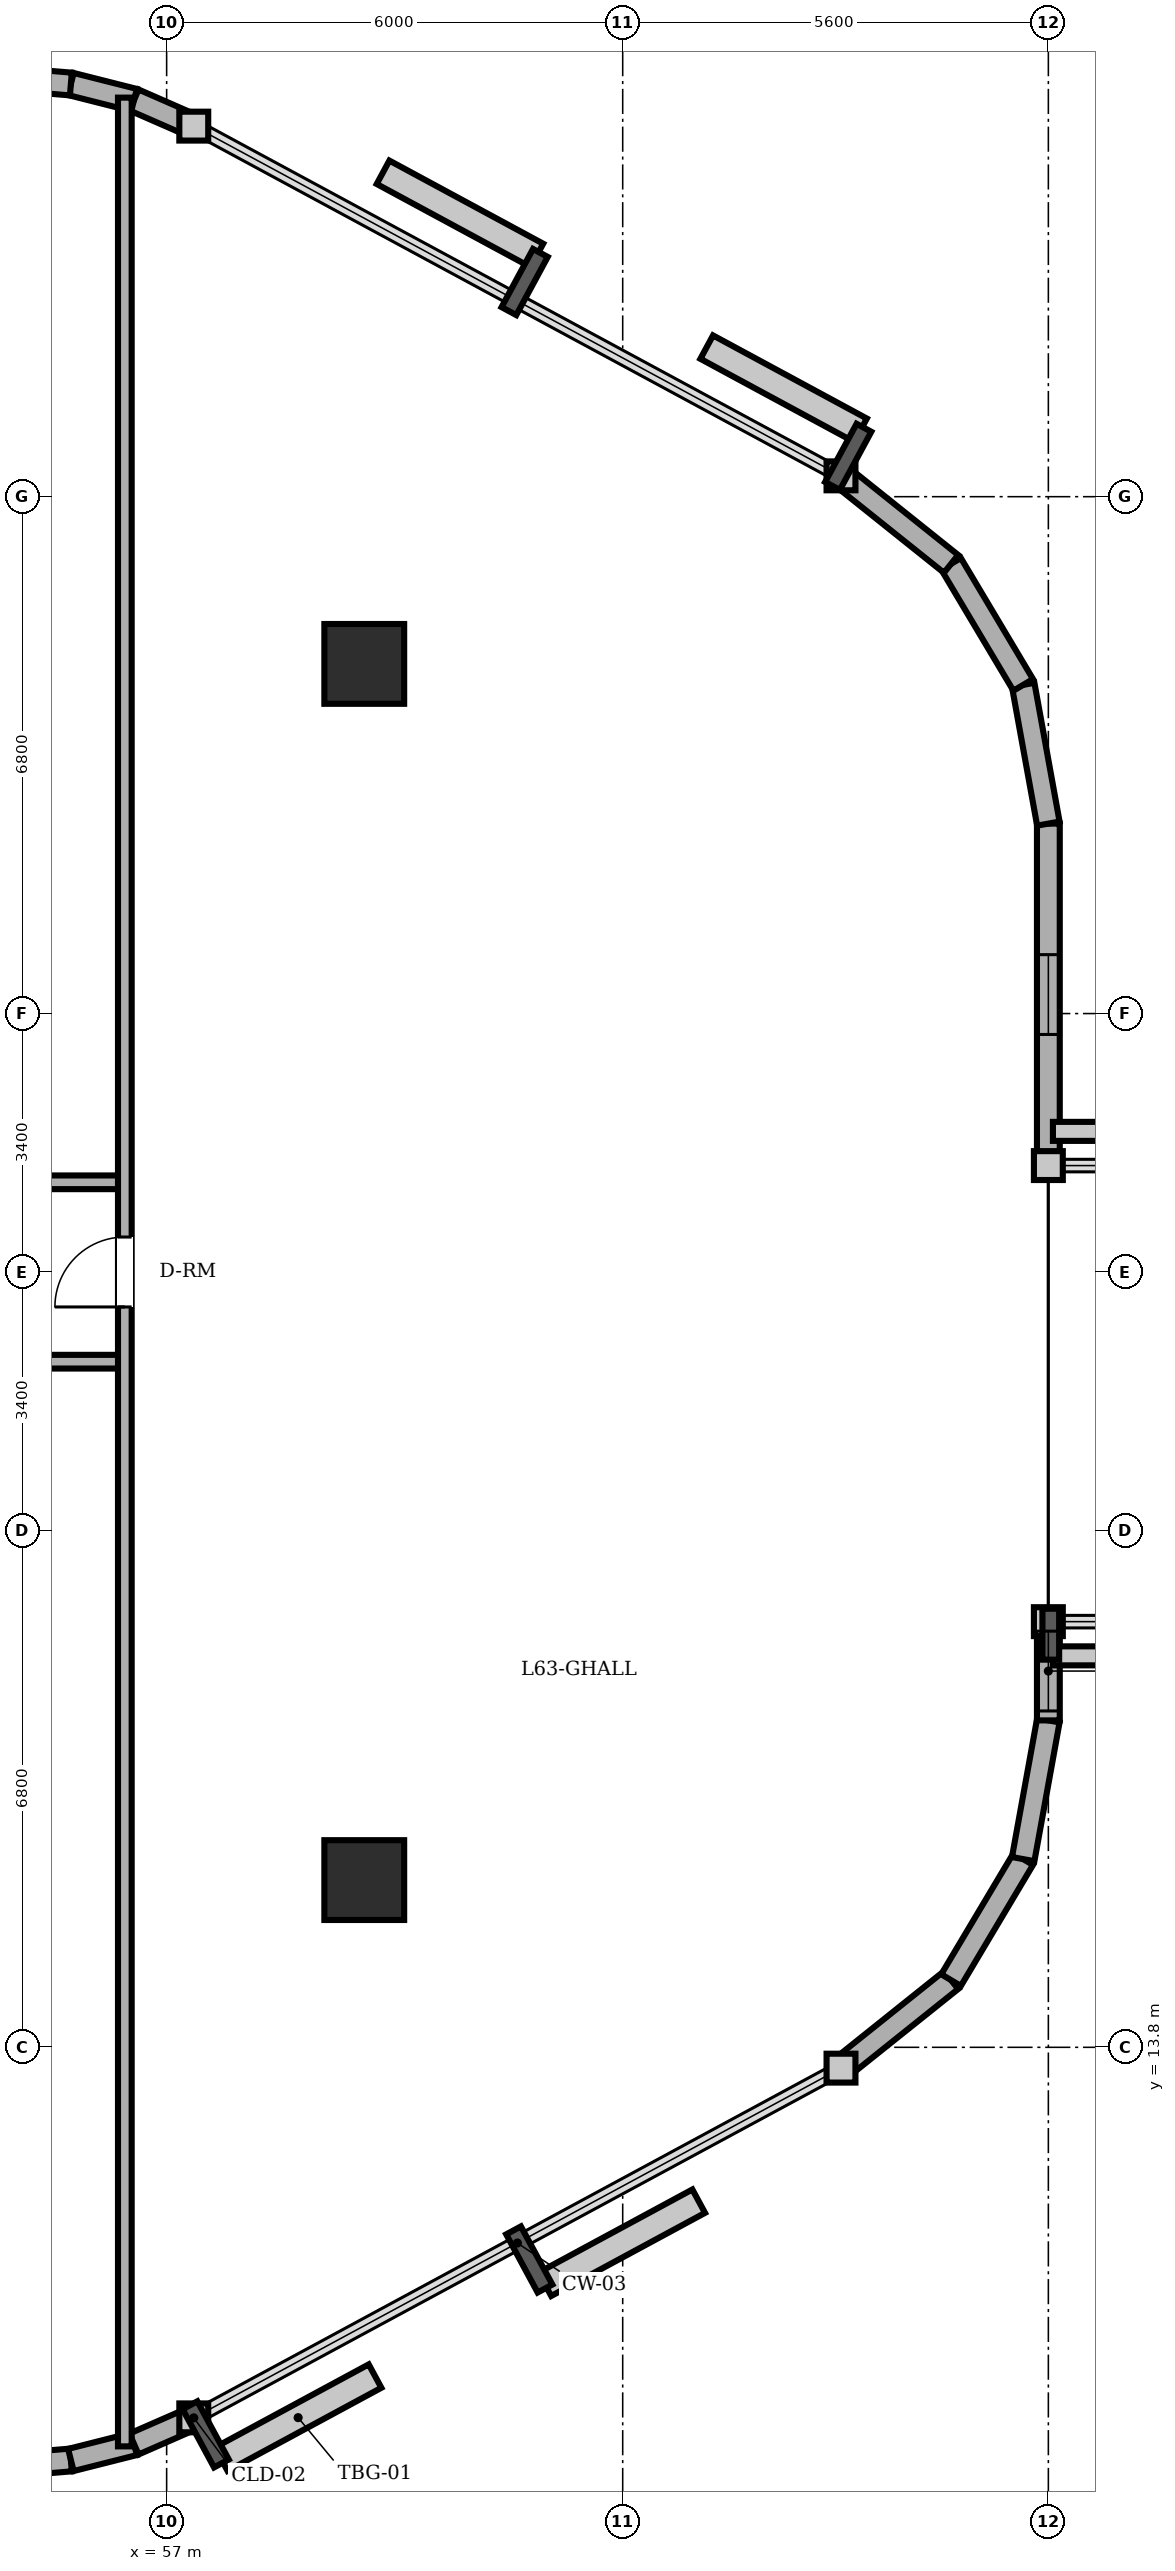
"""IFC4 building model, lengths in metres.
Left out: names, types, materials, properties, quantities, classifications, styles, units other than length and angle.
Written with IfcOpenShell. Run it as: python <this file> out.ifc"""

import sys

from ifc_helpers import new_model, si_unit, direction, frame, frame_2d, origin, origin_2d, place, context, subcontext, project, spatial, rectangle, circle, extrude, element, fill, save


model = new_model("IFC4")
c1 = context("Model", 3, precision=1e-05, world=origin(), true_north=direction((0.0, 1.0)))
c2 = subcontext(c1, "Body", "Model", "MODEL_VIEW")
j1 = project(units=[si_unit("LENGTHUNIT", "METRE"), si_unit("PLANEANGLEUNIT", "RADIAN")], contexts=[c1])
p1 = place(None, origin())
s1 = spatial("IfcSite", under=j1, at=p1, CompositionType="ELEMENT")
p2 = place(p1, origin())
s2 = spatial("IfcBuilding", under=s1, at=p2, CompositionType="ELEMENT")
p3 = place(p2, frame((0.0, 0.0, 240.9)))
s3 = spatial("IfcBuildingStorey", under=s2, at=p3, CompositionType="ELEMENT", Elevation=240.9)
for number, where, z_axis, x_axis in (
    (1, (59.6, 16.0, 0.0), (0.0, 0.0, 1.0), (1.0, 0.0, 0.0)),
    (2, (59.6, 32.0, 0.0), (0.0, 0.0, 1.0), (1.0, 0.0, 0.0)),
):
    element("IfcColumn", number, at=place(p3, frame(where, z_axis=z_axis, x_axis=x_axis)), inside=s3, PredefinedType="COLUMN", context=c2, shape_type="SweptSolid", body=[
        extrude(circle(Radius=0.525, at=origin_2d()), origin(), (0.0, 0.0, 1.0), 3.6),
    ])
p4 = place(p3, frame((54.885, 8.3, 0.0), z_axis=(0.0, 0.0, 1.0), x_axis=(0.996565355958, 0.082809971041, 0.0)))
e3 = element("IfcWall", 3, at=p4, inside=s3, PredefinedType="SOLIDWALL", context=c2, shape_type="SweptSolid", body=[
    extrude(rectangle(XDim=0.858, YDim=0.3, at=frame_2d((0.429, 0.0))), origin(), (0.0, 0.0, 1.0), 3.4),
])
p5 = place(p3, frame((55.74, 8.371, 0.0), z_axis=(0.0, 0.0, 1.0), x_axis=(0.969536346338, 0.244947490555, 0.0)))
e4 = element("IfcWall", 4, at=p5, inside=s3, PredefinedType="SOLIDWALL", context=c2, shape_type="SweptSolid", body=[
    extrude(rectangle(XDim=0.857, YDim=0.3, at=frame_2d((0.429, 0.0))), origin(), (0.0, 0.0, 1.0), 3.4),
])
p6 = place(p3, frame((56.571, 8.581, 0.0), z_axis=(0.0, 0.0, 1.0), x_axis=(0.916085473636, 0.400983048261, 0.0)))
e5 = element("IfcWall", 5, at=p6, inside=s3, PredefinedType="SOLIDWALL", context=c2, shape_type="SweptSolid", body=[
    extrude(rectangle(XDim=0.858, YDim=0.3, at=frame_2d((0.429, 0.0))), origin(), (0.0, 0.0, 1.0), 3.4),
])
p7 = place(p3, frame((65.872, 13.526, 0.0), z_axis=(0.0, 0.0, 1.0), x_axis=(0.780920189257, 0.624630817372, 0.0)))
e6 = element("IfcWall", 6, at=p7, inside=s3, PredefinedType="SOLIDWALL", context=c2, shape_type="SweptSolid", body=[
    extrude(rectangle(XDim=1.854, YDim=0.3, at=frame_2d((0.927, 0.0))), origin(), (0.0, 0.0, 1.0), 3.4),
])
p8 = place(p3, frame((67.32, 14.684, 0.0), z_axis=(0.0, 0.0, 1.0), x_axis=(0.512072018927, 0.858942516955, 0.0)))
e7 = element("IfcWall", 7, at=p8, inside=s3, PredefinedType="SOLIDWALL", context=c2, shape_type="SweptSolid", body=[
    extrude(rectangle(XDim=1.853, YDim=0.3, at=frame_2d((0.927, 0.0))), origin(), (0.0, 0.0, 1.0), 3.4),
])
p9 = place(p3, frame((68.269, 16.276, 0.0), z_axis=(0.0, 0.0, 1.0), x_axis=(0.178468469252, 0.983945631365, 0.0)))
e8 = element("IfcWall", 8, at=p9, inside=s3, PredefinedType="SOLIDWALL", context=c2, shape_type="SweptSolid", body=[
    extrude(rectangle(XDim=1.855, YDim=0.3, at=frame_2d((0.927, 0.0))), origin(), (0.0, 0.0, 1.0), 3.4),
])
p10 = place(p3, frame((68.6, 18.101, 0.0), z_axis=(0.0, 0.0, 1.0), x_axis=(0.0, 1.0, 0.0)))
e9 = element("IfcWall", 9, at=p10, inside=s3, PredefinedType="SOLIDWALL", context=c2, shape_type="SweptSolid", body=[
    extrude(rectangle(XDim=1.299, YDim=0.3, at=frame_2d((0.649, 0.0))), origin(), (0.0, 0.0, 1.0), 3.4),
])
p11 = place(p10, frame((0.124, 0.0, 0.85)))
e10 = element("IfcOpeningElement", 10, at=p11, cuts=e9, PredefinedType="OPENING", context=c2, shape_type="SweptSolid", body=[
    extrude(rectangle(XDim=1.05, YDim=1.55, at=frame_2d((0.525, 0.775))), frame((0.0, 0.16, 0.0), z_axis=(0.0, -1.0, 0.0), x_axis=(1.0, 0.0, 0.0)), (0.0, 0.0, 1.0), 0.32),
])
p12 = place(p3, frame((68.6, 25.4, 0.0), z_axis=(0.0, 0.0, 1.0), x_axis=(0.0, 1.0, 0.0)))
e11 = element("IfcWall", 11, at=p12, inside=s3, PredefinedType="SOLIDWALL", context=c2, shape_type="SweptSolid", body=[
    extrude(rectangle(XDim=4.499, YDim=0.3, at=frame_2d((2.25, 0.0))), origin(), (0.0, 0.0, 1.0), 3.4),
])
p13 = place(p12, frame((1.725, 0.0, 0.85)))
e12 = element("IfcOpeningElement", 12, at=p13, cuts=e11, PredefinedType="OPENING", context=c2, shape_type="SweptSolid", body=[
    extrude(rectangle(XDim=1.05, YDim=1.55, at=frame_2d((0.525, 0.775))), frame((0.0, 0.16, 0.0), z_axis=(0.0, -1.0, 0.0), x_axis=(1.0, 0.0, 0.0)), (0.0, 0.0, 1.0), 0.32),
])
p14 = place(p3, frame((68.6, 29.899, 0.0), z_axis=(0.0, 0.0, 1.0), x_axis=(-0.178468469252, 0.983945631365, 0.0)))
e13 = element("IfcWall", 13, at=p14, inside=s3, PredefinedType="SOLIDWALL", context=c2, shape_type="SweptSolid", body=[
    extrude(rectangle(XDim=1.855, YDim=0.3, at=frame_2d((0.927, 0.0))), origin(), (0.0, 0.0, 1.0), 3.4),
])
p15 = place(p3, frame((68.269, 31.724, 0.0), z_axis=(0.0, 0.0, 1.0), x_axis=(-0.512072018927, 0.858942516955, 0.0)))
e14 = element("IfcWall", 14, at=p15, inside=s3, PredefinedType="SOLIDWALL", context=c2, shape_type="SweptSolid", body=[
    extrude(rectangle(XDim=1.853, YDim=0.3, at=frame_2d((0.927, 0.0))), origin(), (0.0, 0.0, 1.0), 3.4),
])
p16 = place(p3, frame((67.32, 33.316, 0.0), z_axis=(0.0, 0.0, 1.0), x_axis=(-0.780920189257, 0.624630817372, 0.0)))
e15 = element("IfcWall", 15, at=p16, inside=s3, PredefinedType="SOLIDWALL", context=c2, shape_type="SweptSolid", body=[
    extrude(rectangle(XDim=1.854, YDim=0.3, at=frame_2d((0.927, 0.0))), origin(), (0.0, 0.0, 1.0), 3.4),
])
p17 = place(p3, frame((57.357, 39.075, 0.0), z_axis=(0.0, 0.0, 1.0), x_axis=(-0.916085473636, 0.400983048261, 0.0)))
e16 = element("IfcWall", 16, at=p17, inside=s3, PredefinedType="SOLIDWALL", context=c2, shape_type="SweptSolid", body=[
    extrude(rectangle(XDim=0.858, YDim=0.3, at=frame_2d((0.429, 0.0))), origin(), (0.0, 0.0, 1.0), 3.4),
])
p18 = place(p3, frame((56.571, 39.419, 0.0), z_axis=(0.0, 0.0, 1.0), x_axis=(-0.969536346338, 0.244947490555, 0.0)))
e17 = element("IfcWall", 17, at=p18, inside=s3, PredefinedType="SOLIDWALL", context=c2, shape_type="SweptSolid", body=[
    extrude(rectangle(XDim=0.857, YDim=0.3, at=frame_2d((0.429, 0.0))), origin(), (0.0, 0.0, 1.0), 3.4),
])
p19 = place(p3, frame((55.74, 39.629, 0.0), z_axis=(0.0, 0.0, 1.0), x_axis=(-0.996565355958, 0.082809971041, 0.0)))
e18 = element("IfcWall", 18, at=p19, inside=s3, PredefinedType="SOLIDWALL", context=c2, shape_type="SweptSolid", body=[
    extrude(rectangle(XDim=0.858, YDim=0.3, at=frame_2d((0.429, 0.0))), origin(), (0.0, 0.0, 1.0), 3.4),
])
p20 = place(p3, frame((41.75, 22.82, 0.0), z_axis=(0.0, 0.0, 1.0), x_axis=(1.0, 0.0, 0.0)))
e19 = element("IfcWall", 19, at=p20, inside=s3, PredefinedType="PARTITIONING", context=c2, shape_type="SweptSolid", body=[
    extrude(rectangle(XDim=14.7, YDim=0.18, at=frame_2d((7.35, 0.0))), origin(), (0.0, 0.0, 1.0), 3.4),
])
p21 = place(p20, frame((6.89, 0.0, 0.0)))
e20 = element("IfcOpeningElement", 20, at=p21, cuts=e19, PredefinedType="OPENING", context=c2, shape_type="SweptSolid", body=[
    extrude(rectangle(XDim=0.92, YDim=2.1, at=frame_2d((0.46, 1.05))), frame((0.0, 0.1, 0.0), z_axis=(0.0, -1.0, 0.0), x_axis=(1.0, 0.0, 0.0)), (0.0, 0.0, 1.0), 0.2),
])
p22 = place(p3, frame((41.75, 25.18, 0.0), z_axis=(0.0, 0.0, 1.0), x_axis=(1.0, 0.0, 0.0)))
e21 = element("IfcWall", 21, at=p22, inside=s3, PredefinedType="PARTITIONING", context=c2, shape_type="SweptSolid", body=[
    extrude(rectangle(XDim=14.7, YDim=0.18, at=frame_2d((7.35, 0.0))), origin(), (0.0, 0.0, 1.0), 3.4),
])
p23 = place(p22, frame((6.89, 0.0, 0.0)))
e22 = element("IfcOpeningElement", 22, at=p23, cuts=e21, PredefinedType="OPENING", context=c2, shape_type="SweptSolid", body=[
    extrude(rectangle(XDim=0.92, YDim=2.1, at=frame_2d((0.46, 1.05))), frame((0.0, 0.1, 0.0), z_axis=(0.0, -1.0, 0.0), x_axis=(1.0, 0.0, 0.0)), (0.0, 0.0, 1.0), 0.2),
])
p24 = place(p3, frame((56.45, 8.55, 0.0), z_axis=(0.0, 0.0, 1.0), x_axis=(0.0, 1.0, 0.0)))
e23 = element("IfcWall", 23, at=p24, inside=s3, PredefinedType="PARTITIONING", context=c2, shape_type="SweptSolid", body=[
    extrude(rectangle(XDim=30.9, YDim=0.18, at=frame_2d((15.45, 0.0))), origin(), (0.0, 0.0, 1.0), 3.4),
])
p25 = place(p24, frame((14.99, 0.0, 0.0)))
e24 = element("IfcOpeningElement", 24, at=p25, cuts=e23, PredefinedType="OPENING", context=c2, shape_type="SweptSolid", body=[
    extrude(rectangle(XDim=0.92, YDim=2.1, at=frame_2d((0.46, 1.05))), frame((0.0, 0.1, 0.0), z_axis=(0.0, -1.0, 0.0), x_axis=(1.0, 0.0, 0.0)), (0.0, 0.0, 1.0), 0.2),
])
p26 = place(p11, origin())
e25 = element("IfcWindow", 25, at=p26, inside=s3, PartitioningType="SINGLE_PANEL", PredefinedType="WINDOW", context=c2, shape_type="SweptSolid", body=[
    extrude(rectangle(XDim=1.05, YDim=1.55, at=frame_2d((0.525, 0.775))), frame((0.0, 0.03, 0.0), z_axis=(0.0, -1.0, 0.0), x_axis=(1.0, 0.0, 0.0)), (0.0, 0.0, 1.0), 0.06),
])
fill(e10, e25)
p27 = place(p13, origin())
e26 = element("IfcWindow", 26, at=p27, inside=s3, PartitioningType="SINGLE_PANEL", PredefinedType="WINDOW", context=c2, shape_type="SweptSolid", body=[
    extrude(rectangle(XDim=1.05, YDim=1.55, at=frame_2d((0.525, 0.775))), frame((0.0, 0.03, 0.0), z_axis=(0.0, -1.0, 0.0), x_axis=(1.0, 0.0, 0.0)), (0.0, 0.0, 1.0), 0.06),
])
fill(e12, e26)
p28 = place(p25, origin())
e27 = element("IfcDoor", 27, at=p28, inside=s3, OperationType="SINGLE_SWING_LEFT", PredefinedType="DOOR", context=c2, shape_type="SweptSolid", body=[
    extrude(rectangle(XDim=0.92, YDim=2.1, at=frame_2d((0.46, 1.05))), frame((0.0, 0.025, 0.0), z_axis=(0.0, -1.0, 0.0), x_axis=(1.0, 0.0, 0.0)), (0.0, 0.0, 1.0), 0.05),
])
fill(e24, e27)
save(model, sys.argv[1])
